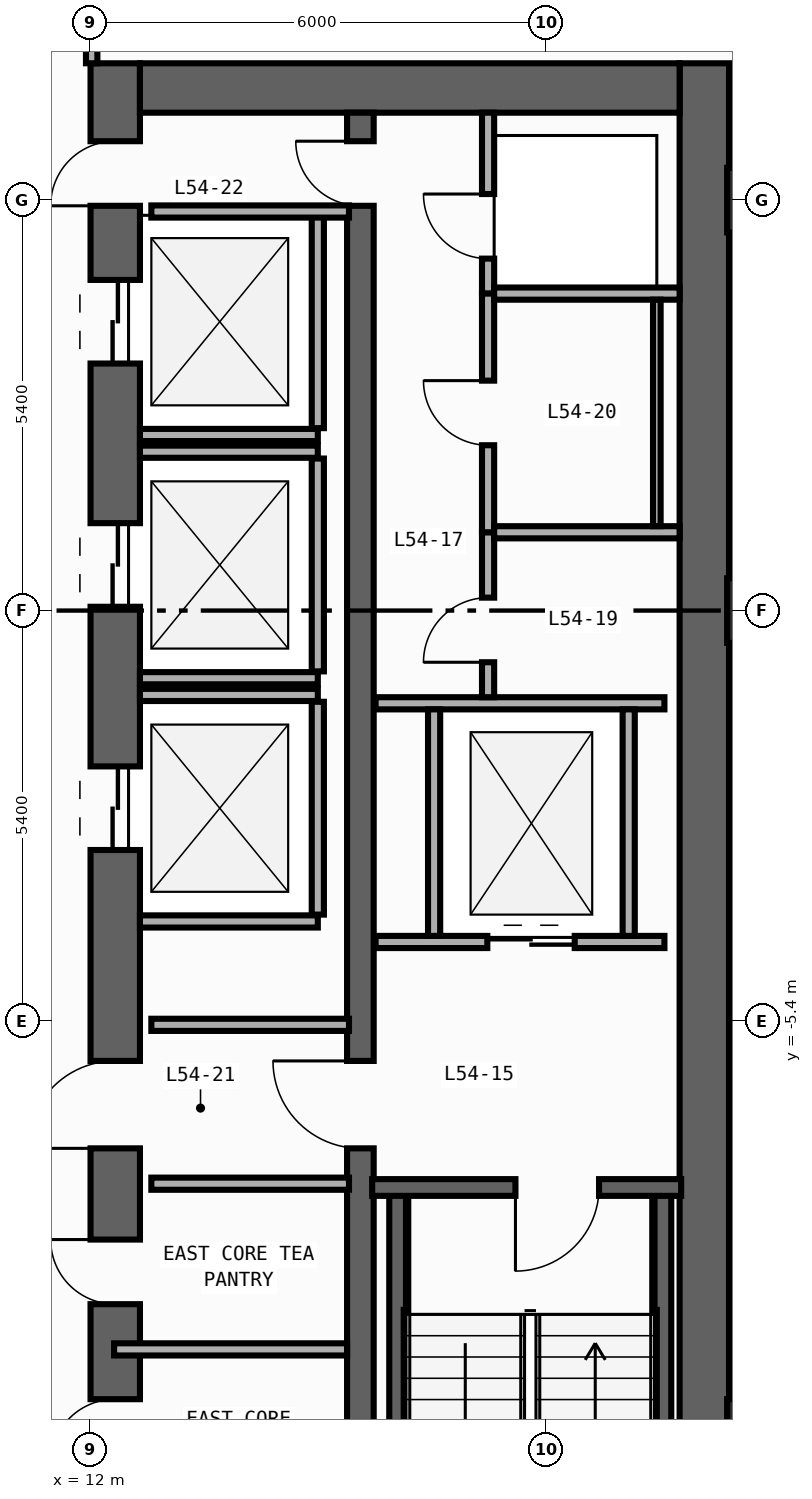
"""IFC4 building model, lengths in metres.
Left out: names, types, materials, properties, quantities, classifications, styles, units other than length and angle.
Written with IfcOpenShell. Run it as: python <this file> out.ifc"""

import sys

from ifc_helpers import new_model, si_unit, direction, frame, frame_2d, origin, origin_2d, place, context, subcontext, project, spatial, rectangle, extrude, element, fill, save


model = new_model("IFC4")
c1 = context("Model", 3, precision=1e-05, world=origin(), true_north=direction((0.0, 1.0)))
c2 = subcontext(c1, "Body", "Model", "MODEL_VIEW")
j1 = project(units=[si_unit("LENGTHUNIT", "METRE"), si_unit("PLANEANGLEUNIT", "RADIAN")], contexts=[c1])
p1 = place(None, origin())
s1 = spatial("IfcSite", under=j1, at=p1, CompositionType="ELEMENT")
p2 = place(p1, origin())
s2 = spatial("IfcBuilding", under=s1, at=p2, CompositionType="ELEMENT")
p3 = place(p2, frame((0.0, 0.0, 233.2)))
s3 = spatial("IfcBuildingStorey", under=s2, at=p3, CompositionType="ELEMENT", Elevation=233.2)
p4 = place(p3, frame((12.325, -19.8, 0.0), z_axis=(0.0, 0.0, 1.0), x_axis=(0.0, 1.0, 0.0)))
e1 = element("IfcWall", 1, at=p4, inside=s3, PredefinedType="SHEAR", context=c2, shape_type="SweptSolid", body=[
    extrude(rectangle(XDim=27.0, YDim=0.65, at=frame_2d((13.5, 0.0))), origin(), (0.0, 0.0, 1.0), 3.34),
])
p5 = place(p4, frame((23.05, 0.0, 0.0)))
e2 = element("IfcOpeningElement", 2, at=p5, cuts=e1, PredefinedType="OPENING", context=c2, shape_type="SweptSolid", body=[
    extrude(rectangle(XDim=1.1, YDim=2.2, at=frame_2d((0.55, 1.1))), frame((0.0, 0.335, 0.0), z_axis=(0.0, -1.0, 0.0), x_axis=(1.0, 0.0, 0.0)), (0.0, 0.0, 1.0), 0.67),
])
p6 = place(p4, frame((19.85, 0.0, 0.0)))
e3 = element("IfcOpeningElement", 3, at=p6, cuts=e1, PredefinedType="OPENING", context=c2, shape_type="SweptSolid", body=[
    extrude(rectangle(XDim=1.1, YDim=2.2, at=frame_2d((0.55, 1.1))), frame((0.0, 0.335, 0.0), z_axis=(0.0, -1.0, 0.0), x_axis=(1.0, 0.0, 0.0)), (0.0, 0.0, 1.0), 0.67),
])
p7 = place(p4, frame((16.65, 0.0, 0.0)))
e4 = element("IfcOpeningElement", 4, at=p7, cuts=e1, PredefinedType="OPENING", context=c2, shape_type="SweptSolid", body=[
    extrude(rectangle(XDim=1.1, YDim=2.2, at=frame_2d((0.55, 1.1))), frame((0.0, 0.335, 0.0), z_axis=(0.0, -1.0, 0.0), x_axis=(1.0, 0.0, 0.0)), (0.0, 0.0, 1.0), 0.67),
])
p8 = place(p4, frame((6.275, 0.0, 0.0)))
e5 = element("IfcOpeningElement", 5, at=p8, cuts=e1, PredefinedType="OPENING", context=c2, shape_type="SweptSolid", body=[
    extrude(rectangle(XDim=0.85, YDim=2.1, at=frame_2d((0.425, 1.05))), frame((0.0, 0.335, 0.0), z_axis=(0.0, -1.0, 0.0), x_axis=(1.0, 0.0, 0.0)), (0.0, 0.0, 1.0), 0.67),
])
p9 = place(p4, frame((8.575, 0.0, 0.0)))
e6 = element("IfcOpeningElement", 6, at=p9, cuts=e1, PredefinedType="OPENING", context=c2, shape_type="SweptSolid", body=[
    extrude(rectangle(XDim=0.85, YDim=2.1, at=frame_2d((0.425, 1.05))), frame((0.0, 0.335, 0.0), z_axis=(0.0, -1.0, 0.0), x_axis=(1.0, 0.0, 0.0)), (0.0, 0.0, 1.0), 0.67),
])
p10 = place(p4, frame((10.675, 0.0, 0.0)))
e7 = element("IfcOpeningElement", 7, at=p10, cuts=e1, PredefinedType="OPENING", context=c2, shape_type="SweptSolid", body=[
    extrude(rectangle(XDim=0.85, YDim=2.1, at=frame_2d((0.425, 1.05))), frame((0.0, 0.335, 0.0), z_axis=(0.0, -1.0, 0.0), x_axis=(1.0, 0.0, 0.0)), (0.0, 0.0, 1.0), 0.67),
])
p11 = place(p4, frame((12.725, 0.0, 0.0)))
e8 = element("IfcOpeningElement", 8, at=p11, cuts=e1, PredefinedType="OPENING", context=c2, shape_type="SweptSolid", body=[
    extrude(rectangle(XDim=1.15, YDim=2.2, at=frame_2d((0.575, 1.1))), frame((0.0, 0.335, 0.0), z_axis=(0.0, -1.0, 0.0), x_axis=(1.0, 0.0, 0.0)), (0.0, 0.0, 1.0), 0.67),
])
p12 = place(p4, frame((25.125, 0.0, 0.0)))
e9 = element("IfcOpeningElement", 9, at=p12, cuts=e1, PredefinedType="OPENING", context=c2, shape_type="SweptSolid", body=[
    extrude(rectangle(XDim=0.85, YDim=2.1, at=frame_2d((0.425, 1.05))), frame((0.0, 0.335, 0.0), z_axis=(0.0, -1.0, 0.0), x_axis=(1.0, 0.0, 0.0)), (0.0, 0.0, 1.0), 0.67),
])
p13 = place(p3, frame((20.075, -19.8, 0.0), z_axis=(0.0, 0.0, 1.0), x_axis=(0.0, 1.0, 0.0)))
e10 = element("IfcWall", 10, at=p13, inside=s3, PredefinedType="SHEAR", context=c2, shape_type="SweptSolid", body=[
    extrude(rectangle(XDim=27.0, YDim=0.65, at=frame_2d((13.5, 0.0))), origin(), (0.0, 0.0, 1.0), 3.34),
])
p14 = place(p3, frame((12.65, 6.875, 0.0), z_axis=(0.0, 0.0, 1.0), x_axis=(1.0, 0.0, 0.0)))
e11 = element("IfcWall", 11, at=p14, inside=s3, PredefinedType="SHEAR", context=c2, shape_type="SweptSolid", body=[
    extrude(rectangle(XDim=7.1, YDim=0.65, at=frame_2d((3.55, 0.0))), origin(), (0.0, 0.0, 1.0), 3.34),
])
p15 = place(p3, frame((15.55, -19.15, 0.0), z_axis=(0.0, 0.0, 1.0), x_axis=(0.0, 1.0, 0.0)))
e12 = element("IfcWall", 12, at=p15, inside=s3, PredefinedType="SHEAR", context=c2, shape_type="SweptSolid", body=[
    extrude(rectangle(XDim=25.7, YDim=0.35, at=frame_2d((12.85, 0.0))), origin(), (0.0, 0.0, 1.0), 3.34),
])
p16 = place(p15, frame((12.075, 0.0, 0.0)))
e13 = element("IfcOpeningElement", 13, at=p16, cuts=e12, PredefinedType="OPENING", context=c2, shape_type="SweptSolid", body=[
    extrude(rectangle(XDim=1.15, YDim=2.2, at=frame_2d((0.575, 1.1))), frame((0.0, 0.185, 0.0), z_axis=(0.0, -1.0, 0.0), x_axis=(1.0, 0.0, 0.0)), (0.0, 0.0, 1.0), 0.37),
])
p17 = place(p15, frame((24.475, 0.0, 0.0)))
e14 = element("IfcOpeningElement", 14, at=p17, cuts=e12, PredefinedType="OPENING", context=c2, shape_type="SweptSolid", body=[
    extrude(rectangle(XDim=0.85, YDim=2.1, at=frame_2d((0.425, 1.05))), frame((0.0, 0.185, 0.0), z_axis=(0.0, -1.0, 0.0), x_axis=(1.0, 0.0, 0.0)), (0.0, 0.0, 1.0), 0.37),
])
for number, where, z_axis, x_axis in (
    (15, (16.04, -19.01, 0.0), (0.0, 0.0, 1.0), (0.0, 1.0, 0.0)),
    (16, (19.53, -19.01, 0.0), (0.0, 0.0, 1.0), (0.0, 1.0, 0.0)),
):
    element("IfcWall", number, at=place(p3, frame(where, z_axis=z_axis, x_axis=x_axis)), inside=s3, PredefinedType="SHEAR", context=c2, shape_type="SweptSolid", body=[
        extrude(rectangle(XDim=11.42, YDim=0.22, at=frame_2d((5.71, 0.0))), origin(), (0.0, 0.0, 1.0), 3.34),
    ])
p18 = place(p3, frame((19.77, -7.59, 0.0), z_axis=(0.0, 0.0, 1.0), x_axis=(-1.0, 0.0, 0.0)))
e17 = element("IfcWall", 17, at=p18, inside=s3, PredefinedType="SHEAR", context=c2, shape_type="SweptSolid", body=[
    extrude(rectangle(XDim=4.065, YDim=0.22, at=frame_2d((2.032, 0.0))), origin(), (0.0, 0.0, 1.0), 3.34),
])
p19 = place(p18, frame((1.08, 0.0, 0.0)))
e18 = element("IfcOpeningElement", 18, at=p19, cuts=e17, PredefinedType="OPENING", context=c2, shape_type="SweptSolid", body=[
    extrude(rectangle(XDim=1.1, YDim=2.2, at=frame_2d((0.55, 1.1))), frame((0.0, 0.12, 0.0), z_axis=(0.0, -1.0, 0.0), x_axis=(1.0, 0.0, 0.0)), (0.0, 0.0, 1.0), 0.24),
])
for number, where, z_axis, x_axis in (
    (19, (20.8, -10.8, 0.0), (0.0, 0.0, 1.0), (1.0, 0.0, 0.0)),
    (20, (20.8, 0.0, 0.0), (0.0, 0.0, 1.0), (1.0, 0.0, 0.0)),
    (21, (20.8, 5.4, 0.0), (0.0, 0.0, 1.0), (1.0, 0.0, 0.0)),
):
    element("IfcColumn", number, at=place(p3, frame(where, z_axis=z_axis, x_axis=x_axis)), inside=s3, PredefinedType="COLUMN", context=c2, shape_type="SweptSolid", body=[
        extrude(rectangle(XDim=0.85, YDim=0.85, at=origin_2d()), origin(), (0.0, 0.0, 1.0), 3.6),
    ])
p20 = place(p3, frame((12.65, 2.31, 0.0), z_axis=(0.0, 0.0, 1.0), x_axis=(1.0, 0.0, 0.0)))
e22 = element("IfcWall", 22, at=p20, inside=s3, PredefinedType="STANDARD", context=c2, shape_type="SweptSolid", body=[
    extrude(rectangle(XDim=2.34, YDim=0.16, at=frame_2d((1.17, 0.0))), origin(), (0.0, 0.0, 1.0), 3.34),
])
p21 = place(p3, frame((14.99, 2.4, 0.0), z_axis=(0.0, 0.0, 1.0), x_axis=(0.0, 1.0, 0.0)))
e23 = element("IfcWall", 23, at=p21, inside=s3, PredefinedType="STANDARD", context=c2, shape_type="SweptSolid", body=[
    extrude(rectangle(XDim=2.8, YDim=0.16, at=frame_2d((1.4, 0.0))), origin(), (0.0, 0.0, 1.0), 3.34),
])
for number, where, z_axis, x_axis in (
    (24, (12.65, -0.89, 0.0), (0.0, 0.0, 1.0), (1.0, 0.0, 0.0)),
    (25, (12.65, 2.09, 0.0), (0.0, 0.0, 1.0), (1.0, 0.0, 0.0)),
):
    element("IfcWall", number, at=place(p3, frame(where, z_axis=z_axis, x_axis=x_axis)), inside=s3, PredefinedType="STANDARD", context=c2, shape_type="SweptSolid", body=[
        extrude(rectangle(XDim=2.34, YDim=0.16, at=frame_2d((1.17, 0.0))), origin(), (0.0, 0.0, 1.0), 3.34),
    ])
p22 = place(p3, frame((14.99, -0.8, 0.0), z_axis=(0.0, 0.0, 1.0), x_axis=(0.0, 1.0, 0.0)))
e26 = element("IfcWall", 26, at=p22, inside=s3, PredefinedType="STANDARD", context=c2, shape_type="SweptSolid", body=[
    extrude(rectangle(XDim=2.8, YDim=0.16, at=frame_2d((1.4, 0.0))), origin(), (0.0, 0.0, 1.0), 3.34),
])
for number, where, z_axis, x_axis in (
    (27, (12.65, -4.09, 0.0), (0.0, 0.0, 1.0), (1.0, 0.0, 0.0)),
    (28, (12.65, -1.11, 0.0), (0.0, 0.0, 1.0), (1.0, 0.0, 0.0)),
):
    element("IfcWall", number, at=place(p3, frame(where, z_axis=z_axis, x_axis=x_axis)), inside=s3, PredefinedType="STANDARD", context=c2, shape_type="SweptSolid", body=[
        extrude(rectangle(XDim=2.34, YDim=0.16, at=frame_2d((1.17, 0.0))), origin(), (0.0, 0.0, 1.0), 3.34),
    ])
p23 = place(p3, frame((14.99, -4.0, 0.0), z_axis=(0.0, 0.0, 1.0), x_axis=(0.0, 1.0, 0.0)))
e29 = element("IfcWall", 29, at=p23, inside=s3, PredefinedType="STANDARD", context=c2, shape_type="SweptSolid", body=[
    extrude(rectangle(XDim=2.8, YDim=0.16, at=frame_2d((1.4, 0.0))), origin(), (0.0, 0.0, 1.0), 3.34),
])
p24 = place(p3, frame((15.75, -4.36, 0.0), z_axis=(0.0, 0.0, 1.0), x_axis=(1.0, 0.0, 0.0)))
e30 = element("IfcWall", 30, at=p24, inside=s3, PredefinedType="STANDARD", context=c2, shape_type="SweptSolid", body=[
    extrude(rectangle(XDim=3.8, YDim=0.16, at=frame_2d((1.9, 0.0))), origin(), (0.0, 0.0, 1.0), 3.34),
])
p25 = place(p24, frame((1.47, 0.0, 0.0)))
e31 = element("IfcOpeningElement", 31, at=p25, cuts=e30, PredefinedType="OPENING", context=c2, shape_type="SweptSolid", body=[
    extrude(rectangle(XDim=1.15, YDim=2.2, at=frame_2d((0.575, 1.1))), frame((0.0, 0.09, 0.0), z_axis=(0.0, -1.0, 0.0), x_axis=(1.0, 0.0, 0.0)), (0.0, 0.0, 1.0), 0.18),
])
p26 = place(p3, frame((15.75, -1.22, 0.0), z_axis=(0.0, 0.0, 1.0), x_axis=(1.0, 0.0, 0.0)))
e32 = element("IfcWall", 32, at=p26, inside=s3, PredefinedType="STANDARD", context=c2, shape_type="SweptSolid", body=[
    extrude(rectangle(XDim=3.8, YDim=0.16, at=frame_2d((1.9, 0.0))), origin(), (0.0, 0.0, 1.0), 3.34),
])
for number, where, z_axis, x_axis in (
    (33, (16.52, -4.28, 0.0), (0.0, 0.0, 1.0), (0.0, 1.0, 0.0)),
    (34, (19.08, -4.28, 0.0), (0.0, 0.0, 1.0), (0.0, 1.0, 0.0)),
):
    element("IfcWall", number, at=place(p3, frame(where, z_axis=z_axis, x_axis=x_axis)), inside=s3, PredefinedType="STANDARD", context=c2, shape_type="SweptSolid", body=[
        extrude(rectangle(XDim=2.98, YDim=0.16, at=frame_2d((1.49, 0.0))), origin(), (0.0, 0.0, 1.0), 3.34),
    ])
for number, where, z_axis, x_axis in (
    (35, (12.8, -5.45, 0.0), (0.0, 0.0, 1.0), (1.0, 0.0, 0.0)),
    (36, (12.8, -7.54, 0.0), (0.0, 0.0, 1.0), (1.0, 0.0, 0.0)),
    (37, (12.8, 5.25, 0.0), (0.0, 0.0, 1.0), (1.0, 0.0, 0.0)),
):
    element("IfcWall", number, at=place(p3, frame(where, z_axis=z_axis, x_axis=x_axis)), inside=s3, PredefinedType="STANDARD", context=c2, shape_type="SweptSolid", body=[
        extrude(rectangle(XDim=2.6, YDim=0.16, at=frame_2d((1.3, 0.0))), origin(), (0.0, 0.0, 1.0), 3.34),
    ])
p27 = place(p3, frame((17.23, 4.17, 0.0), z_axis=(0.0, 0.0, 1.0), x_axis=(0.0, 1.0, 0.0)))
e38 = element("IfcWall", 38, at=p27, inside=s3, PredefinedType="PARTITIONING", context=c2, shape_type="SweptSolid", body=[
    extrude(rectangle(XDim=2.38, YDim=0.16, at=frame_2d((1.19, 0.0))), origin(), (0.0, 0.0, 1.0), 3.34),
])
p28 = place(p27, frame((0.46, 0.0, 0.0)))
e39 = element("IfcOpeningElement", 39, at=p28, cuts=e38, PredefinedType="OPENING", context=c2, shape_type="SweptSolid", body=[
    extrude(rectangle(XDim=0.85, YDim=2.1, at=frame_2d((0.425, 1.05))), frame((0.0, 0.09, 0.0), z_axis=(0.0, -1.0, 0.0), x_axis=(1.0, 0.0, 0.0)), (0.0, 0.0, 1.0), 0.18),
])
p29 = place(p3, frame((17.23, -1.14, 0.0), z_axis=(0.0, 0.0, 1.0), x_axis=(0.0, 1.0, 0.0)))
e40 = element("IfcWall", 40, at=p29, inside=s3, PredefinedType="PARTITIONING", context=c2, shape_type="SweptSolid", body=[
    extrude(rectangle(XDim=2.17, YDim=0.16, at=frame_2d((1.085, 0.0))), origin(), (0.0, 0.0, 1.0), 3.34),
])
p30 = place(p29, frame((0.46, 0.0, 0.0)))
e41 = element("IfcOpeningElement", 41, at=p30, cuts=e40, PredefinedType="OPENING", context=c2, shape_type="SweptSolid", body=[
    extrude(rectangle(XDim=0.85, YDim=2.1, at=frame_2d((0.425, 1.05))), frame((0.0, 0.09, 0.0), z_axis=(0.0, -1.0, 0.0), x_axis=(1.0, 0.0, 0.0)), (0.0, 0.0, 1.0), 0.18),
])
p31 = place(p3, frame((17.23, 1.03, 0.0), z_axis=(0.0, 0.0, 1.0), x_axis=(0.0, 1.0, 0.0)))
e42 = element("IfcWall", 42, at=p31, inside=s3, PredefinedType="PARTITIONING", context=c2, shape_type="SweptSolid", body=[
    extrude(rectangle(XDim=3.14, YDim=0.16, at=frame_2d((1.57, 0.0))), origin(), (0.0, 0.0, 1.0), 3.34),
])
p32 = place(p31, frame((1.145, 0.0, 0.0)))
e43 = element("IfcOpeningElement", 43, at=p32, cuts=e42, PredefinedType="OPENING", context=c2, shape_type="SweptSolid", body=[
    extrude(rectangle(XDim=0.85, YDim=2.1, at=frame_2d((0.425, 1.05))), frame((0.0, 0.09, 0.0), z_axis=(0.0, -1.0, 0.0), x_axis=(1.0, 0.0, 0.0)), (0.0, 0.0, 1.0), 0.18),
])
for number, where, z_axis, x_axis in (
    (44, (17.31, 4.17, 0.0), (0.0, 0.0, 1.0), (1.0, 0.0, 0.0)),
    (45, (17.31, 1.03, 0.0), (0.0, 0.0, 1.0), (1.0, 0.0, 0.0)),
):
    element("IfcWall", number, at=place(p3, frame(where, z_axis=z_axis, x_axis=x_axis)), inside=s3, PredefinedType="PARTITIONING", context=c2, shape_type="SweptSolid", body=[
        extrude(rectangle(XDim=2.44, YDim=0.16, at=frame_2d((1.22, 0.0))), origin(), (0.0, 0.0, 1.0), 3.34),
    ])
p33 = place(p3, frame((12.31, -9.72, 0.0), z_axis=(0.0, 0.0, 1.0), x_axis=(1.0, 0.0, 0.0)))
e46 = element("IfcWall", 46, at=p33, inside=s3, PredefinedType="PARTITIONING", context=c2, shape_type="SweptSolid", body=[
    extrude(rectangle(XDim=3.065, YDim=0.16, at=frame_2d((1.532, 0.0))), origin(), (0.0, 0.0, 1.0), 3.34),
])
p34 = place(p3, frame((12.015, 7.2, 0.0), z_axis=(0.0, 0.0, 1.0), x_axis=(0.0, 1.0, 0.0)))
e47 = element("IfcWall", 47, at=p34, inside=s3, PredefinedType="PARTITIONING", context=c2, shape_type="SweptSolid", body=[
    extrude(rectangle(XDim=6.52, YDim=0.15, at=frame_2d((3.26, 0.0))), origin(), (0.0, 0.0, 1.0), 3.34),
])
p35 = place(p34, frame((0.67, 0.0, 0.0)))
e48 = element("IfcOpeningElement", 48, at=p35, cuts=e47, PredefinedType="OPENING", context=c2, shape_type="SweptSolid", body=[
    extrude(rectangle(XDim=0.9, YDim=2.15, at=frame_2d((0.45, 1.075))), frame((0.0, 0.085, 0.0), z_axis=(0.0, -1.0, 0.0), x_axis=(1.0, 0.0, 0.0)), (0.0, 0.0, 1.0), 0.17),
])
p36 = place(p3, frame((19.45, 4.09, 0.0), z_axis=(0.0, 0.0, 1.0), x_axis=(0.0, -1.0, 0.0)))
e49 = element("IfcWall", 49, at=p36, inside=s3, PredefinedType="PARTITIONING", context=c2, shape_type="SweptSolid", body=[
    extrude(rectangle(XDim=2.98, YDim=0.1, at=frame_2d((1.49, 0.0))), origin(), (0.0, 0.0, 1.0), 3.34),
])
p37 = place(p19, origin())
e50 = element("IfcDoor", 50, at=p37, inside=s3, OperationType="SINGLE_SWING_RIGHT", PredefinedType="DOOR", context=c2, shape_type="SweptSolid", body=[
    extrude(rectangle(XDim=1.1, YDim=2.2, at=frame_2d((0.55, 1.1))), frame((0.0, 0.025, 0.0), z_axis=(0.0, -1.0, 0.0), x_axis=(1.0, 0.0, 0.0)), (0.0, 0.0, 1.0), 0.05),
])
fill(e18, e50)
p38 = place(p5, origin())
e51 = element("IfcDoor", 51, at=p38, inside=s3, OperationType="DOUBLE_DOOR_SLIDING", PredefinedType="DOOR", context=c2, shape_type="SweptSolid", body=[
    extrude(rectangle(XDim=1.1, YDim=2.2, at=frame_2d((0.55, 1.1))), frame((0.0, 0.025, 0.0), z_axis=(0.0, -1.0, 0.0), x_axis=(1.0, 0.0, 0.0)), (0.0, 0.0, 1.0), 0.05),
])
fill(e2, e51)
p39 = place(p6, origin())
e52 = element("IfcDoor", 52, at=p39, inside=s3, OperationType="DOUBLE_DOOR_SLIDING", PredefinedType="DOOR", context=c2, shape_type="SweptSolid", body=[
    extrude(rectangle(XDim=1.1, YDim=2.2, at=frame_2d((0.55, 1.1))), frame((0.0, 0.025, 0.0), z_axis=(0.0, -1.0, 0.0), x_axis=(1.0, 0.0, 0.0)), (0.0, 0.0, 1.0), 0.05),
])
fill(e3, e52)
p40 = place(p7, origin())
e53 = element("IfcDoor", 53, at=p40, inside=s3, OperationType="DOUBLE_DOOR_SLIDING", PredefinedType="DOOR", context=c2, shape_type="SweptSolid", body=[
    extrude(rectangle(XDim=1.1, YDim=2.2, at=frame_2d((0.55, 1.1))), frame((0.0, 0.025, 0.0), z_axis=(0.0, -1.0, 0.0), x_axis=(1.0, 0.0, 0.0)), (0.0, 0.0, 1.0), 0.05),
])
fill(e4, e53)
p41 = place(p9, origin())
e54 = element("IfcDoor", 54, at=p41, inside=s3, OperationType="SINGLE_SWING_LEFT", PredefinedType="DOOR", context=c2, shape_type="SweptSolid", body=[
    extrude(rectangle(XDim=0.85, YDim=2.1, at=frame_2d((0.425, 1.05))), frame((0.0, 0.025, 0.0), z_axis=(0.0, -1.0, 0.0), x_axis=(1.0, 0.0, 0.0)), (0.0, 0.0, 1.0), 0.05),
])
fill(e6, e54)
p42 = place(p10, origin())
e55 = element("IfcDoor", 55, at=p42, inside=s3, OperationType="SINGLE_SWING_RIGHT", PredefinedType="DOOR", context=c2, shape_type="SweptSolid", body=[
    extrude(rectangle(XDim=0.85, YDim=2.1, at=frame_2d((0.425, 1.05))), frame((0.0, 0.025, 0.0), z_axis=(0.0, -1.0, 0.0), x_axis=(1.0, 0.0, 0.0)), (0.0, 0.0, 1.0), 0.05),
])
fill(e7, e55)
p43 = place(p11, origin())
e56 = element("IfcDoor", 56, at=p43, inside=s3, OperationType="SINGLE_SWING_LEFT", PredefinedType="DOOR", context=c2, shape_type="SweptSolid", body=[
    extrude(rectangle(XDim=1.15, YDim=2.2, at=frame_2d((0.575, 1.1))), frame((0.0, 0.025, 0.0), z_axis=(0.0, -1.0, 0.0), x_axis=(1.0, 0.0, 0.0)), (0.0, 0.0, 1.0), 0.05),
])
fill(e8, e56)
p44 = place(p16, origin())
e57 = element("IfcDoor", 57, at=p44, inside=s3, OperationType="SINGLE_SWING_RIGHT", PredefinedType="DOOR", context=c2, shape_type="SweptSolid", body=[
    extrude(rectangle(XDim=1.15, YDim=2.2, at=frame_2d((0.575, 1.1))), frame((0.0, 0.025, 0.0), z_axis=(0.0, -1.0, 0.0), x_axis=(1.0, 0.0, 0.0)), (0.0, 0.0, 1.0), 0.05),
])
fill(e13, e57)
p45 = place(p12, origin())
e58 = element("IfcDoor", 58, at=p45, inside=s3, OperationType="SINGLE_SWING_LEFT", PredefinedType="DOOR", context=c2, shape_type="SweptSolid", body=[
    extrude(rectangle(XDim=0.85, YDim=2.1, at=frame_2d((0.425, 1.05))), frame((0.0, 0.025, 0.0), z_axis=(0.0, -1.0, 0.0), x_axis=(1.0, 0.0, 0.0)), (0.0, 0.0, 1.0), 0.05),
])
fill(e9, e58)
p46 = place(p17, origin())
e59 = element("IfcDoor", 59, at=p46, inside=s3, OperationType="SINGLE_SWING_RIGHT", PredefinedType="DOOR", context=c2, shape_type="SweptSolid", body=[
    extrude(rectangle(XDim=0.85, YDim=2.1, at=frame_2d((0.425, 1.05))), frame((0.0, 0.025, 0.0), z_axis=(0.0, -1.0, 0.0), x_axis=(1.0, 0.0, 0.0)), (0.0, 0.0, 1.0), 0.05),
])
fill(e14, e59)
p47 = place(p25, origin())
e60 = element("IfcDoor", 60, at=p47, inside=s3, OperationType="DOUBLE_DOOR_SLIDING", PredefinedType="DOOR", context=c2, shape_type="SweptSolid", body=[
    extrude(rectangle(XDim=1.15, YDim=2.2, at=frame_2d((0.575, 1.1))), frame((0.0, 0.025, 0.0), z_axis=(0.0, -1.0, 0.0), x_axis=(1.0, 0.0, 0.0)), (0.0, 0.0, 1.0), 0.05),
])
fill(e31, e60)
p48 = place(p28, origin())
e61 = element("IfcDoor", 61, at=p48, inside=s3, OperationType="SINGLE_SWING_RIGHT", PredefinedType="DOOR", context=c2, shape_type="SweptSolid", body=[
    extrude(rectangle(XDim=0.85, YDim=2.1, at=frame_2d((0.425, 1.05))), frame((0.0, 0.025, 0.0), z_axis=(0.0, -1.0, 0.0), x_axis=(1.0, 0.0, 0.0)), (0.0, 0.0, 1.0), 0.05),
])
fill(e39, e61)
p49 = place(p30, origin())
e62 = element("IfcDoor", 62, at=p49, inside=s3, OperationType="SINGLE_SWING_LEFT", PredefinedType="DOOR", context=c2, shape_type="SweptSolid", body=[
    extrude(rectangle(XDim=0.85, YDim=2.1, at=frame_2d((0.425, 1.05))), frame((0.0, 0.025, 0.0), z_axis=(0.0, -1.0, 0.0), x_axis=(1.0, 0.0, 0.0)), (0.0, 0.0, 1.0), 0.05),
])
fill(e41, e62)
p50 = place(p32, origin())
e63 = element("IfcDoor", 63, at=p50, inside=s3, OperationType="SINGLE_SWING_RIGHT", PredefinedType="DOOR", context=c2, shape_type="SweptSolid", body=[
    extrude(rectangle(XDim=0.85, YDim=2.1, at=frame_2d((0.425, 1.05))), frame((0.0, 0.025, 0.0), z_axis=(0.0, -1.0, 0.0), x_axis=(1.0, 0.0, 0.0)), (0.0, 0.0, 1.0), 0.05),
])
fill(e43, e63)
save(model, sys.argv[1])
